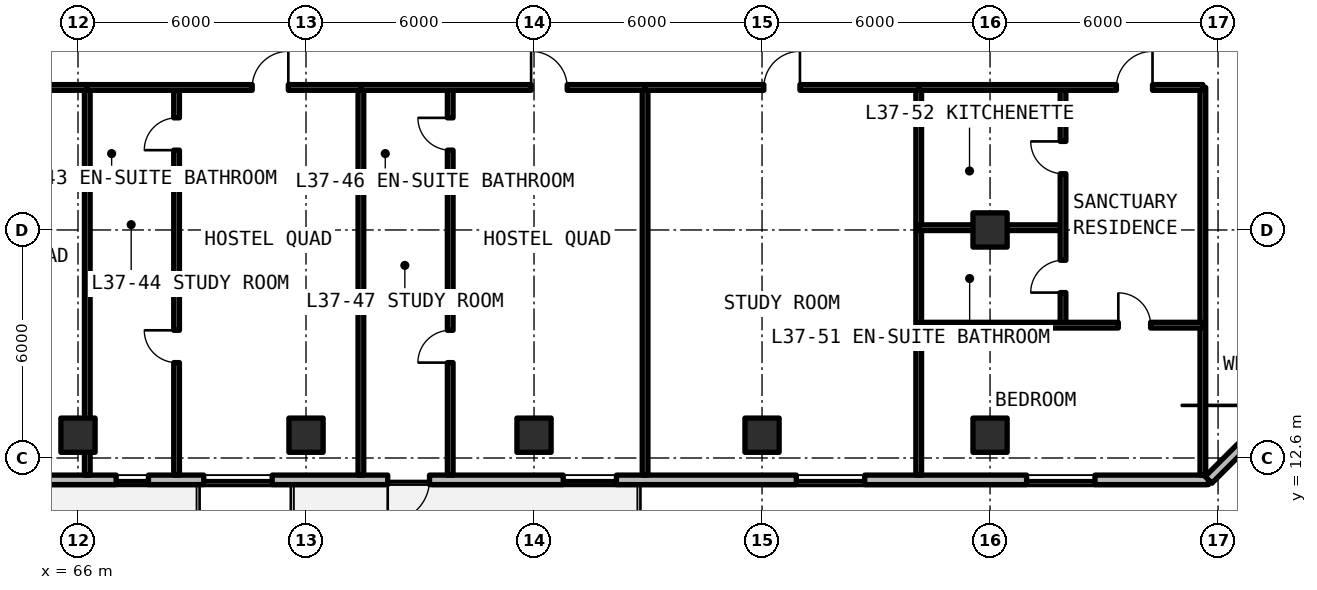
"""IFC4 building model, lengths in metres.
Left out: names, types, materials, properties, quantities, classifications, styles, units other than length and angle.
Written with IfcOpenShell. Run it as: python <this file> out.ifc"""

import sys

from ifc_helpers import new_model, si_unit, direction, frame, frame_2d, origin, origin_2d, place, context, subcontext, project, spatial, rectangle, extrude, element, fill, save


model = new_model("IFC4")
c1 = context("Model", 3, precision=1e-05, world=origin(), true_north=direction((0.0, 1.0)))
c2 = subcontext(c1, "Body", "Model", "MODEL_VIEW")
j1 = project(units=[si_unit("LENGTHUNIT", "METRE"), si_unit("PLANEANGLEUNIT", "RADIAN")], contexts=[c1])
p1 = place(None, origin())
s1 = spatial("IfcSite", under=j1, at=p1, CompositionType="ELEMENT")
p2 = place(p1, origin())
s2 = spatial("IfcBuilding", under=s1, at=p2, CompositionType="ELEMENT")
p3 = place(p2, frame((0.0, 0.0, 135.3)))
s3 = spatial("IfcBuildingStorey", under=s2, at=p3, CompositionType="ELEMENT", Elevation=135.3)
for number, where, z_axis, x_axis in (
    (1, (90.0, 18.6, 0.0), (0.0, 0.0, 1.0), (1.0, 0.0, 0.0)),
    (2, (66.0, 13.2, 0.0), (0.0, 0.0, 1.0), (1.0, 0.0, 0.0)),
    (3, (72.0, 13.2, 0.0), (0.0, 0.0, 1.0), (1.0, 0.0, 0.0)),
    (4, (78.0, 13.2, 0.0), (0.0, 0.0, 1.0), (1.0, 0.0, 0.0)),
    (5, (84.0, 13.2, 0.0), (0.0, 0.0, 1.0), (1.0, 0.0, 0.0)),
    (6, (90.0, 13.2, 0.0), (0.0, 0.0, 1.0), (1.0, 0.0, 0.0)),
):
    element("IfcColumn", number, at=place(p3, frame(where, z_axis=z_axis, x_axis=x_axis)), inside=s3, PredefinedType="COLUMN", context=c2, shape_type="SweptSolid", body=[
        extrude(rectangle(XDim=0.9, YDim=0.9, at=origin_2d()), origin(), (0.0, 0.0, 1.0), 3.3),
    ])
p4 = place(p3, frame((52.125, 12.025, 0.0), z_axis=(0.0, 0.0, 1.0), x_axis=(1.0, 0.0, 0.0)))
e7 = element("IfcWall", 7, at=p4, inside=s3, PredefinedType="SOLIDWALL", context=c2, shape_type="SweptSolid", body=[
    extrude(rectangle(XDim=43.623, YDim=0.25, at=frame_2d((21.812, 0.0))), origin(), (0.0, 0.0, 1.0), 3.08),
])
p5 = place(p4, frame((10.925, 0.0, 0.0)))
e8 = element("IfcOpeningElement", 8, at=p5, cuts=e7, PredefinedType="OPENING", context=c2, shape_type="SweptSolid", body=[
    extrude(rectangle(XDim=1.1, YDim=2.15, at=frame_2d((0.55, 1.075))), frame((0.0, 0.135, 0.0), z_axis=(0.0, -1.0, 0.0), x_axis=(1.0, 0.0, 0.0)), (0.0, 0.0, 1.0), 0.27),
])
p6 = place(p4, frame((22.025, 0.0, 0.0)))
e9 = element("IfcOpeningElement", 9, at=p6, cuts=e7, PredefinedType="OPENING", context=c2, shape_type="SweptSolid", body=[
    extrude(rectangle(XDim=1.1, YDim=2.15, at=frame_2d((0.55, 1.075))), frame((0.0, 0.135, 0.0), z_axis=(0.0, -1.0, 0.0), x_axis=(1.0, 0.0, 0.0)), (0.0, 0.0, 1.0), 0.27),
])
p7 = place(p4, frame((2.738, 0.0, 0.78)))
e10 = element("IfcOpeningElement", 10, at=p7, cuts=e7, PredefinedType="OPENING", context=c2, shape_type="SweptSolid", body=[
    extrude(rectangle(XDim=1.8, YDim=1.66, at=frame_2d((0.9, 0.83))), frame((0.0, 0.135, 0.0), z_axis=(0.0, -1.0, 0.0), x_axis=(1.0, 0.0, 0.0)), (0.0, 0.0, 1.0), 0.27),
])
p8 = place(p4, frame((8.443, 0.0, 0.78)))
e11 = element("IfcOpeningElement", 11, at=p8, cuts=e7, PredefinedType="OPENING", context=c2, shape_type="SweptSolid", body=[
    extrude(rectangle(XDim=0.85, YDim=1.65, at=frame_2d((0.425, 0.825))), frame((0.0, 0.135, 0.0), z_axis=(0.0, -1.0, 0.0), x_axis=(1.0, 0.0, 0.0)), (0.0, 0.0, 1.0), 0.27),
])
p9 = place(p4, frame((14.879, 0.0, 0.78)))
e12 = element("IfcOpeningElement", 12, at=p9, cuts=e7, PredefinedType="OPENING", context=c2, shape_type="SweptSolid", body=[
    extrude(rectangle(XDim=0.85, YDim=1.65, at=frame_2d((0.425, 0.825))), frame((0.0, 0.135, 0.0), z_axis=(0.0, -1.0, 0.0), x_axis=(1.0, 0.0, 0.0)), (0.0, 0.0, 1.0), 0.27),
])
p10 = place(p4, frame((17.184, 0.0, 0.78)))
e13 = element("IfcOpeningElement", 13, at=p10, cuts=e7, PredefinedType="OPENING", context=c2, shape_type="SweptSolid", body=[
    extrude(rectangle(XDim=1.8, YDim=1.66, at=frame_2d((0.9, 0.83))), frame((0.0, 0.135, 0.0), z_axis=(0.0, -1.0, 0.0), x_axis=(1.0, 0.0, 0.0)), (0.0, 0.0, 1.0), 0.27),
])
p11 = place(p4, frame((26.643, 0.0, 0.78)))
e14 = element("IfcOpeningElement", 14, at=p11, cuts=e7, PredefinedType="OPENING", context=c2, shape_type="SweptSolid", body=[
    extrude(rectangle(XDim=1.4, YDim=1.65, at=frame_2d((0.7, 0.825))), frame((0.0, 0.135, 0.0), z_axis=(0.0, -1.0, 0.0), x_axis=(1.0, 0.0, 0.0)), (0.0, 0.0, 1.0), 0.27),
])
p12 = place(p4, frame((32.777, 0.0, 0.78)))
e15 = element("IfcOpeningElement", 15, at=p12, cuts=e7, PredefinedType="OPENING", context=c2, shape_type="SweptSolid", body=[
    extrude(rectangle(XDim=1.8, YDim=1.66, at=frame_2d((0.9, 0.83))), frame((0.0, 0.135, 0.0), z_axis=(0.0, -1.0, 0.0), x_axis=(1.0, 0.0, 0.0)), (0.0, 0.0, 1.0), 0.27),
])
p13 = place(p4, frame((38.836, 0.0, 0.78)))
e16 = element("IfcOpeningElement", 16, at=p13, cuts=e7, PredefinedType="OPENING", context=c2, shape_type="SweptSolid", body=[
    extrude(rectangle(XDim=1.8, YDim=1.66, at=frame_2d((0.9, 0.83))), frame((0.0, 0.135, 0.0), z_axis=(0.0, -1.0, 0.0), x_axis=(1.0, 0.0, 0.0)), (0.0, 0.0, 1.0), 0.27),
])
p14 = place(p3, frame((95.748, 12.025, 0.0), z_axis=(0.0, 0.0, 1.0), x_axis=(0.70708586489, 0.707127696864, 0.0)))
e17 = element("IfcWall", 17, at=p14, inside=s3, PredefinedType="SOLIDWALL", context=c2, shape_type="SweptSolid", body=[
    extrude(rectangle(XDim=5.836, YDim=0.25, at=frame_2d((2.918, 0.0))), origin(), (0.0, 0.0, 1.0), 3.08),
])
p15 = place(p14, frame((1.218, 0.0, 0.78)))
e18 = element("IfcOpeningElement", 18, at=p15, cuts=e17, PredefinedType="OPENING", context=c2, shape_type="SweptSolid", body=[
    extrude(rectangle(XDim=3.4, YDim=1.66, at=frame_2d((1.7, 0.83))), frame((0.0, 0.135, 0.0), z_axis=(0.0, -1.0, 0.0), x_axis=(1.0, 0.0, 0.0)), (0.0, 0.0, 1.0), 0.27),
])
for number, where, z_axis, x_axis in (
    (19, (95.6, 12.15, 0.0), (0.0, 0.0, 1.0), (0.0, 1.0, 0.0)),
    (20, (66.244, 12.15, 0.0), (0.0, 0.0, 1.0), (0.0, 1.0, 0.0)),
):
    element("IfcWall", number, at=place(p3, frame(where, z_axis=z_axis, x_axis=x_axis)), inside=s3, PredefinedType="SOLIDWALL", context=c2, shape_type="SweptSolid", body=[
        extrude(rectangle(XDim=10.2, YDim=0.15, at=frame_2d((5.1, 0.0))), origin(), (0.0, 0.0, 1.0), 2.35),
    ])
p16 = place(p3, frame((58.767, 22.35, 0.0), z_axis=(0.0, 0.0, 1.0), x_axis=(1.0, 0.0, 0.0)))
e21 = element("IfcWall", 21, at=p16, inside=s3, PredefinedType="SOLIDWALL", context=c2, shape_type="SweptSolid", body=[
    extrude(rectangle(XDim=7.478, YDim=0.15, at=frame_2d((3.739, 0.0))), origin(), (0.0, 0.0, 1.0), 2.35),
])
p17 = place(p16, frame((4.881, 0.0, 0.0)))
e22 = element("IfcOpeningElement", 22, at=p17, cuts=e21, PredefinedType="OPENING", context=c2, shape_type="SweptSolid", body=[
    extrude(rectangle(XDim=0.95, YDim=2.15, at=frame_2d((0.475, 1.075))), frame((0.0, 0.085, 0.0), z_axis=(0.0, -1.0, 0.0), x_axis=(1.0, 0.0, 0.0)), (0.0, 0.0, 1.0), 0.17),
])
p18 = place(p3, frame((73.445, 12.15, 0.0), z_axis=(0.0, 0.0, 1.0), x_axis=(0.0, 1.0, 0.0)))
e23 = element("IfcWall", 23, at=p18, inside=s3, PredefinedType="SOLIDWALL", context=c2, shape_type="SweptSolid", body=[
    extrude(rectangle(XDim=10.2, YDim=0.15, at=frame_2d((5.1, 0.0))), origin(), (0.0, 0.0, 1.0), 2.35),
])
p19 = place(p3, frame((66.244, 19.9, 0.0), z_axis=(0.0, 0.0, 1.0), x_axis=(1.0, 0.0, 0.0)))
e24 = element("IfcWall", 24, at=p19, inside=s3, PredefinedType="PARTITIONING", context=c2, shape_type="SweptSolid", body=[
    extrude(rectangle(XDim=2.35, YDim=0.15, at=frame_2d((1.175, 0.0))), origin(), (0.0, 0.0, 1.0), 2.35),
])
p20 = place(p3, frame((68.594, 12.15, 0.0), z_axis=(0.0, 0.0, 1.0), x_axis=(0.0, 1.0, 0.0)))
e25 = element("IfcWall", 25, at=p20, inside=s3, PredefinedType="PARTITIONING", context=c2, shape_type="SweptSolid", body=[
    extrude(rectangle(XDim=10.2, YDim=0.15, at=frame_2d((5.1, 0.0))), origin(), (0.0, 0.0, 1.0), 2.35),
])
p21 = place(p20, frame((2.96, 0.0, 0.0)))
e26 = element("IfcOpeningElement", 26, at=p21, cuts=e25, PredefinedType="OPENING", context=c2, shape_type="SweptSolid", body=[
    extrude(rectangle(XDim=0.85, YDim=2.1, at=frame_2d((0.425, 1.05))), frame((0.0, 0.085, 0.0), z_axis=(0.0, -1.0, 0.0), x_axis=(1.0, 0.0, 0.0)), (0.0, 0.0, 1.0), 0.17),
])
p22 = place(p20, frame((8.55, 0.0, 0.0)))
e27 = element("IfcOpeningElement", 27, at=p22, cuts=e25, PredefinedType="OPENING", context=c2, shape_type="SweptSolid", body=[
    extrude(rectangle(XDim=0.85, YDim=2.1, at=frame_2d((0.425, 1.05))), frame((0.0, 0.085, 0.0), z_axis=(0.0, -1.0, 0.0), x_axis=(1.0, 0.0, 0.0)), (0.0, 0.0, 1.0), 0.17),
])
p23 = place(p3, frame((66.244, 22.35, 0.0), z_axis=(0.0, 0.0, 1.0), x_axis=(1.0, 0.0, 0.0)))
e28 = element("IfcWall", 28, at=p23, inside=s3, PredefinedType="SOLIDWALL", context=c2, shape_type="SweptSolid", body=[
    extrude(rectangle(XDim=7.2, YDim=0.15, at=frame_2d((3.6, 0.0))), origin(), (0.0, 0.0, 1.0), 2.35),
])
p24 = place(p23, frame((4.34, 0.0, 0.0)))
e29 = element("IfcOpeningElement", 29, at=p24, cuts=e28, PredefinedType="OPENING", context=c2, shape_type="SweptSolid", body=[
    extrude(rectangle(XDim=0.95, YDim=2.15, at=frame_2d((0.475, 1.075))), frame((0.0, 0.085, 0.0), z_axis=(0.0, -1.0, 0.0), x_axis=(1.0, 0.0, 0.0)), (0.0, 0.0, 1.0), 0.17),
])
p25 = place(p3, frame((80.922, 12.15, 0.0), z_axis=(0.0, 0.0, 1.0), x_axis=(0.0, 1.0, 0.0)))
e30 = element("IfcWall", 30, at=p25, inside=s3, PredefinedType="SOLIDWALL", context=c2, shape_type="SweptSolid", body=[
    extrude(rectangle(XDim=10.2, YDim=0.15, at=frame_2d((5.1, 0.0))), origin(), (0.0, 0.0, 1.0), 2.35),
])
p26 = place(p3, frame((73.445, 19.9, 0.0), z_axis=(0.0, 0.0, 1.0), x_axis=(1.0, 0.0, 0.0)))
e31 = element("IfcWall", 31, at=p26, inside=s3, PredefinedType="PARTITIONING", context=c2, shape_type="SweptSolid", body=[
    extrude(rectangle(XDim=2.35, YDim=0.15, at=frame_2d((1.175, 0.0))), origin(), (0.0, 0.0, 1.0), 2.35),
])
p27 = place(p3, frame((75.795, 12.15, 0.0), z_axis=(0.0, 0.0, 1.0), x_axis=(0.0, 1.0, 0.0)))
e32 = element("IfcWall", 32, at=p27, inside=s3, PredefinedType="PARTITIONING", context=c2, shape_type="SweptSolid", body=[
    extrude(rectangle(XDim=10.2, YDim=0.15, at=frame_2d((5.1, 0.0))), origin(), (0.0, 0.0, 1.0), 2.35),
])
p28 = place(p27, frame((2.96, 0.0, 0.0)))
e33 = element("IfcOpeningElement", 33, at=p28, cuts=e32, PredefinedType="OPENING", context=c2, shape_type="SweptSolid", body=[
    extrude(rectangle(XDim=0.85, YDim=2.1, at=frame_2d((0.425, 1.05))), frame((0.0, 0.085, 0.0), z_axis=(0.0, -1.0, 0.0), x_axis=(1.0, 0.0, 0.0)), (0.0, 0.0, 1.0), 0.17),
])
p29 = place(p27, frame((8.55, 0.0, 0.0)))
e34 = element("IfcOpeningElement", 34, at=p29, cuts=e32, PredefinedType="OPENING", context=c2, shape_type="SweptSolid", body=[
    extrude(rectangle(XDim=0.85, YDim=2.1, at=frame_2d((0.425, 1.05))), frame((0.0, 0.085, 0.0), z_axis=(0.0, -1.0, 0.0), x_axis=(1.0, 0.0, 0.0)), (0.0, 0.0, 1.0), 0.17),
])
p30 = place(p3, frame((73.445, 22.35, 0.0), z_axis=(0.0, 0.0, 1.0), x_axis=(1.0, 0.0, 0.0)))
e35 = element("IfcWall", 35, at=p30, inside=s3, PredefinedType="SOLIDWALL", context=c2, shape_type="SweptSolid", body=[
    extrude(rectangle(XDim=7.478, YDim=0.15, at=frame_2d((3.739, 0.0))), origin(), (0.0, 0.0, 1.0), 2.35),
])
p31 = place(p30, frame((4.479, 0.0, 0.0)))
e36 = element("IfcOpeningElement", 36, at=p31, cuts=e35, PredefinedType="OPENING", context=c2, shape_type="SweptSolid", body=[
    extrude(rectangle(XDim=0.95, YDim=2.15, at=frame_2d((0.475, 1.075))), frame((0.0, 0.085, 0.0), z_axis=(0.0, -1.0, 0.0), x_axis=(1.0, 0.0, 0.0)), (0.0, 0.0, 1.0), 0.17),
])
p32 = place(p3, frame((88.123, 12.15, 0.0), z_axis=(0.0, 0.0, 1.0), x_axis=(0.0, 1.0, 0.0)))
e37 = element("IfcWall", 37, at=p32, inside=s3, PredefinedType="SOLIDWALL", context=c2, shape_type="SweptSolid", body=[
    extrude(rectangle(XDim=10.2, YDim=0.15, at=frame_2d((5.1, 0.0))), origin(), (0.0, 0.0, 1.0), 2.35),
])
p33 = place(p3, frame((80.922, 22.35, 0.0), z_axis=(0.0, 0.0, 1.0), x_axis=(1.0, 0.0, 0.0)))
e38 = element("IfcWall", 38, at=p33, inside=s3, PredefinedType="SOLIDWALL", context=c2, shape_type="SweptSolid", body=[
    extrude(rectangle(XDim=7.2, YDim=0.15, at=frame_2d((3.6, 0.0))), origin(), (0.0, 0.0, 1.0), 2.35),
])
p34 = place(p33, frame((3.125, 0.0, 0.0)))
e39 = element("IfcOpeningElement", 39, at=p34, cuts=e38, PredefinedType="OPENING", context=c2, shape_type="SweptSolid", body=[
    extrude(rectangle(XDim=0.95, YDim=2.15, at=frame_2d((0.475, 1.075))), frame((0.0, 0.085, 0.0), z_axis=(0.0, -1.0, 0.0), x_axis=(1.0, 0.0, 0.0)), (0.0, 0.0, 1.0), 0.17),
])
p35 = place(p3, frame((88.123, 18.66, 0.0), z_axis=(0.0, 0.0, 1.0), x_axis=(1.0, 0.0, 0.0)))
e40 = element("IfcWall", 40, at=p35, inside=s3, PredefinedType="PARTITIONING", context=c2, shape_type="SweptSolid", body=[
    extrude(rectangle(XDim=3.797, YDim=0.15, at=frame_2d((1.899, 0.0))), origin(), (0.0, 0.0, 1.0), 2.35),
])
p36 = place(p3, frame((91.92, 16.095, 0.0), z_axis=(0.0, 0.0, 1.0), x_axis=(0.0, 1.0, 0.0)))
e41 = element("IfcWall", 41, at=p36, inside=s3, PredefinedType="PARTITIONING", context=c2, shape_type="SweptSolid", body=[
    extrude(rectangle(XDim=6.255, YDim=0.15, at=frame_2d((3.127, 0.0))), origin(), (0.0, 0.0, 1.0), 2.35),
])
p37 = place(p36, frame((0.857, 0.0, 0.0)))
e42 = element("IfcOpeningElement", 42, at=p37, cuts=e41, PredefinedType="OPENING", context=c2, shape_type="SweptSolid", body=[
    extrude(rectangle(XDim=0.85, YDim=2.1, at=frame_2d((0.425, 1.05))), frame((0.0, 0.085, 0.0), z_axis=(0.0, -1.0, 0.0), x_axis=(1.0, 0.0, 0.0)), (0.0, 0.0, 1.0), 0.17),
])
p38 = place(p36, frame((3.985, 0.0, 0.0)))
e43 = element("IfcOpeningElement", 43, at=p38, cuts=e41, PredefinedType="OPENING", context=c2, shape_type="SweptSolid", body=[
    extrude(rectangle(XDim=0.85, YDim=2.1, at=frame_2d((0.425, 1.05))), frame((0.0, 0.085, 0.0), z_axis=(0.0, -1.0, 0.0), x_axis=(1.0, 0.0, 0.0)), (0.0, 0.0, 1.0), 0.17),
])
p39 = place(p3, frame((88.123, 16.095, 0.0), z_axis=(0.0, 0.0, 1.0), x_axis=(1.0, 0.0, 0.0)))
e44 = element("IfcWall", 44, at=p39, inside=s3, PredefinedType="PARTITIONING", context=c2, shape_type="SweptSolid", body=[
    extrude(rectangle(XDim=7.478, YDim=0.15, at=frame_2d((3.739, 0.0))), origin(), (0.0, 0.0, 1.0), 2.35),
])
p40 = place(p39, frame((5.252, 0.0, 0.0)))
e45 = element("IfcOpeningElement", 45, at=p40, cuts=e44, PredefinedType="OPENING", context=c2, shape_type="SweptSolid", body=[
    extrude(rectangle(XDim=0.85, YDim=2.1, at=frame_2d((0.425, 1.05))), frame((0.0, 0.085, 0.0), z_axis=(0.0, -1.0, 0.0), x_axis=(1.0, 0.0, 0.0)), (0.0, 0.0, 1.0), 0.17),
])
p41 = place(p3, frame((88.123, 22.35, 0.0), z_axis=(0.0, 0.0, 1.0), x_axis=(1.0, 0.0, 0.0)))
e46 = element("IfcWall", 46, at=p41, inside=s3, PredefinedType="SOLIDWALL", context=c2, shape_type="SweptSolid", body=[
    extrude(rectangle(XDim=7.478, YDim=0.15, at=frame_2d((3.739, 0.0))), origin(), (0.0, 0.0, 1.0), 2.35),
])
p42 = place(p41, frame((5.202, 0.0, 0.0)))
e47 = element("IfcOpeningElement", 47, at=p42, cuts=e46, PredefinedType="OPENING", context=c2, shape_type="SweptSolid", body=[
    extrude(rectangle(XDim=0.95, YDim=2.15, at=frame_2d((0.475, 1.075))), frame((0.0, 0.085, 0.0), z_axis=(0.0, -1.0, 0.0), x_axis=(1.0, 0.0, 0.0)), (0.0, 0.0, 1.0), 0.17),
])
p43 = place(p6, frame((1.1, 0.0, 0.0), z_axis=(0.0, 0.0, 1.0), x_axis=(-1.0, 0.0, 0.0)))
e48 = element("IfcDoor", 48, at=p43, inside=s3, OperationType="SINGLE_SWING_RIGHT", PredefinedType="DOOR", context=c2, shape_type="SweptSolid", body=[
    extrude(rectangle(XDim=1.1, YDim=2.15, at=frame_2d((0.55, 1.075))), frame((0.0, 0.025, 0.0), z_axis=(0.0, -1.0, 0.0), x_axis=(1.0, 0.0, 0.0)), (0.0, 0.0, 1.0), 0.05),
])
fill(e9, e48)
p44 = place(p9, origin())
e49 = element("IfcWindow", 49, at=p44, inside=s3, PartitioningType="SINGLE_PANEL", PredefinedType="WINDOW", context=c2, shape_type="SweptSolid", body=[
    extrude(rectangle(XDim=0.85, YDim=1.65, at=frame_2d((0.425, 0.825))), frame((0.0, 0.03, 0.0), z_axis=(0.0, -1.0, 0.0), x_axis=(1.0, 0.0, 0.0)), (0.0, 0.0, 1.0), 0.06),
])
fill(e12, e49)
p45 = place(p10, origin())
e50 = element("IfcWindow", 50, at=p45, inside=s3, PartitioningType="SINGLE_PANEL", PredefinedType="WINDOW", context=c2, shape_type="SweptSolid", body=[
    extrude(rectangle(XDim=1.8, YDim=1.66, at=frame_2d((0.9, 0.83))), frame((0.0, 0.03, 0.0), z_axis=(0.0, -1.0, 0.0), x_axis=(1.0, 0.0, 0.0)), (0.0, 0.0, 1.0), 0.06),
])
fill(e13, e50)
p46 = place(p11, origin())
e51 = element("IfcWindow", 51, at=p46, inside=s3, PartitioningType="SINGLE_PANEL", PredefinedType="WINDOW", context=c2, shape_type="SweptSolid", body=[
    extrude(rectangle(XDim=1.4, YDim=1.65, at=frame_2d((0.7, 0.825))), frame((0.0, 0.03, 0.0), z_axis=(0.0, -1.0, 0.0), x_axis=(1.0, 0.0, 0.0)), (0.0, 0.0, 1.0), 0.06),
])
fill(e14, e51)
p47 = place(p12, origin())
e52 = element("IfcWindow", 52, at=p47, inside=s3, PartitioningType="SINGLE_PANEL", PredefinedType="WINDOW", context=c2, shape_type="SweptSolid", body=[
    extrude(rectangle(XDim=1.8, YDim=1.66, at=frame_2d((0.9, 0.83))), frame((0.0, 0.03, 0.0), z_axis=(0.0, -1.0, 0.0), x_axis=(1.0, 0.0, 0.0)), (0.0, 0.0, 1.0), 0.06),
])
fill(e15, e52)
p48 = place(p13, origin())
e53 = element("IfcWindow", 53, at=p48, inside=s3, PartitioningType="SINGLE_PANEL", PredefinedType="WINDOW", context=c2, shape_type="SweptSolid", body=[
    extrude(rectangle(XDim=1.8, YDim=1.66, at=frame_2d((0.9, 0.83))), frame((0.0, 0.03, 0.0), z_axis=(0.0, -1.0, 0.0), x_axis=(1.0, 0.0, 0.0)), (0.0, 0.0, 1.0), 0.06),
])
fill(e16, e53)
p49 = place(p21, origin())
e54 = element("IfcDoor", 54, at=p49, inside=s3, OperationType="SINGLE_SWING_RIGHT", PredefinedType="DOOR", context=c2, shape_type="SweptSolid", body=[
    extrude(rectangle(XDim=0.85, YDim=2.1, at=frame_2d((0.425, 1.05))), frame((0.0, 0.025, 0.0), z_axis=(0.0, -1.0, 0.0), x_axis=(1.0, 0.0, 0.0)), (0.0, 0.0, 1.0), 0.05),
])
fill(e26, e54)
p50 = place(p22, origin())
e55 = element("IfcDoor", 55, at=p50, inside=s3, OperationType="SINGLE_SWING_LEFT", PredefinedType="DOOR", context=c2, shape_type="SweptSolid", body=[
    extrude(rectangle(XDim=0.85, YDim=2.1, at=frame_2d((0.425, 1.05))), frame((0.0, 0.025, 0.0), z_axis=(0.0, -1.0, 0.0), x_axis=(1.0, 0.0, 0.0)), (0.0, 0.0, 1.0), 0.05),
])
fill(e27, e55)
p51 = place(p24, origin())
e56 = element("IfcDoor", 56, at=p51, inside=s3, OperationType="SINGLE_SWING_RIGHT", PredefinedType="DOOR", context=c2, shape_type="SweptSolid", body=[
    extrude(rectangle(XDim=0.95, YDim=2.15, at=frame_2d((0.475, 1.075))), frame((0.0, 0.025, 0.0), z_axis=(0.0, -1.0, 0.0), x_axis=(1.0, 0.0, 0.0)), (0.0, 0.0, 1.0), 0.05),
])
fill(e29, e56)
p52 = place(p28, origin())
e57 = element("IfcDoor", 57, at=p52, inside=s3, OperationType="SINGLE_SWING_LEFT", PredefinedType="DOOR", context=c2, shape_type="SweptSolid", body=[
    extrude(rectangle(XDim=0.85, YDim=2.1, at=frame_2d((0.425, 1.05))), frame((0.0, 0.025, 0.0), z_axis=(0.0, -1.0, 0.0), x_axis=(1.0, 0.0, 0.0)), (0.0, 0.0, 1.0), 0.05),
])
fill(e33, e57)
p53 = place(p29, origin())
e58 = element("IfcDoor", 58, at=p53, inside=s3, OperationType="SINGLE_SWING_RIGHT", PredefinedType="DOOR", context=c2, shape_type="SweptSolid", body=[
    extrude(rectangle(XDim=0.85, YDim=2.1, at=frame_2d((0.425, 1.05))), frame((0.0, 0.025, 0.0), z_axis=(0.0, -1.0, 0.0), x_axis=(1.0, 0.0, 0.0)), (0.0, 0.0, 1.0), 0.05),
])
fill(e34, e58)
p54 = place(p31, origin())
e59 = element("IfcDoor", 59, at=p54, inside=s3, OperationType="SINGLE_SWING_LEFT", PredefinedType="DOOR", context=c2, shape_type="SweptSolid", body=[
    extrude(rectangle(XDim=0.95, YDim=2.15, at=frame_2d((0.475, 1.075))), frame((0.0, 0.025, 0.0), z_axis=(0.0, -1.0, 0.0), x_axis=(1.0, 0.0, 0.0)), (0.0, 0.0, 1.0), 0.05),
])
fill(e36, e59)
p55 = place(p34, origin())
e60 = element("IfcDoor", 60, at=p55, inside=s3, OperationType="SINGLE_SWING_RIGHT", PredefinedType="DOOR", context=c2, shape_type="SweptSolid", body=[
    extrude(rectangle(XDim=0.95, YDim=2.15, at=frame_2d((0.475, 1.075))), frame((0.0, 0.025, 0.0), z_axis=(0.0, -1.0, 0.0), x_axis=(1.0, 0.0, 0.0)), (0.0, 0.0, 1.0), 0.05),
])
fill(e39, e60)
p56 = place(p37, origin())
e61 = element("IfcDoor", 61, at=p56, inside=s3, OperationType="SINGLE_SWING_LEFT", PredefinedType="DOOR", context=c2, shape_type="SweptSolid", body=[
    extrude(rectangle(XDim=0.85, YDim=2.1, at=frame_2d((0.425, 1.05))), frame((0.0, 0.025, 0.0), z_axis=(0.0, -1.0, 0.0), x_axis=(1.0, 0.0, 0.0)), (0.0, 0.0, 1.0), 0.05),
])
fill(e42, e61)
p57 = place(p38, origin())
e62 = element("IfcDoor", 62, at=p57, inside=s3, OperationType="SINGLE_SWING_RIGHT", PredefinedType="DOOR", context=c2, shape_type="SweptSolid", body=[
    extrude(rectangle(XDim=0.85, YDim=2.1, at=frame_2d((0.425, 1.05))), frame((0.0, 0.025, 0.0), z_axis=(0.0, -1.0, 0.0), x_axis=(1.0, 0.0, 0.0)), (0.0, 0.0, 1.0), 0.05),
])
fill(e43, e62)
p58 = place(p40, origin())
e63 = element("IfcDoor", 63, at=p58, inside=s3, OperationType="SINGLE_SWING_LEFT", PredefinedType="DOOR", context=c2, shape_type="SweptSolid", body=[
    extrude(rectangle(XDim=0.85, YDim=2.1, at=frame_2d((0.425, 1.05))), frame((0.0, 0.025, 0.0), z_axis=(0.0, -1.0, 0.0), x_axis=(1.0, 0.0, 0.0)), (0.0, 0.0, 1.0), 0.05),
])
fill(e45, e63)
p59 = place(p42, origin())
e64 = element("IfcDoor", 64, at=p59, inside=s3, OperationType="SINGLE_SWING_RIGHT", PredefinedType="DOOR", context=c2, shape_type="SweptSolid", body=[
    extrude(rectangle(XDim=0.95, YDim=2.15, at=frame_2d((0.475, 1.075))), frame((0.0, 0.025, 0.0), z_axis=(0.0, -1.0, 0.0), x_axis=(1.0, 0.0, 0.0)), (0.0, 0.0, 1.0), 0.05),
])
fill(e47, e64)
save(model, sys.argv[1])
